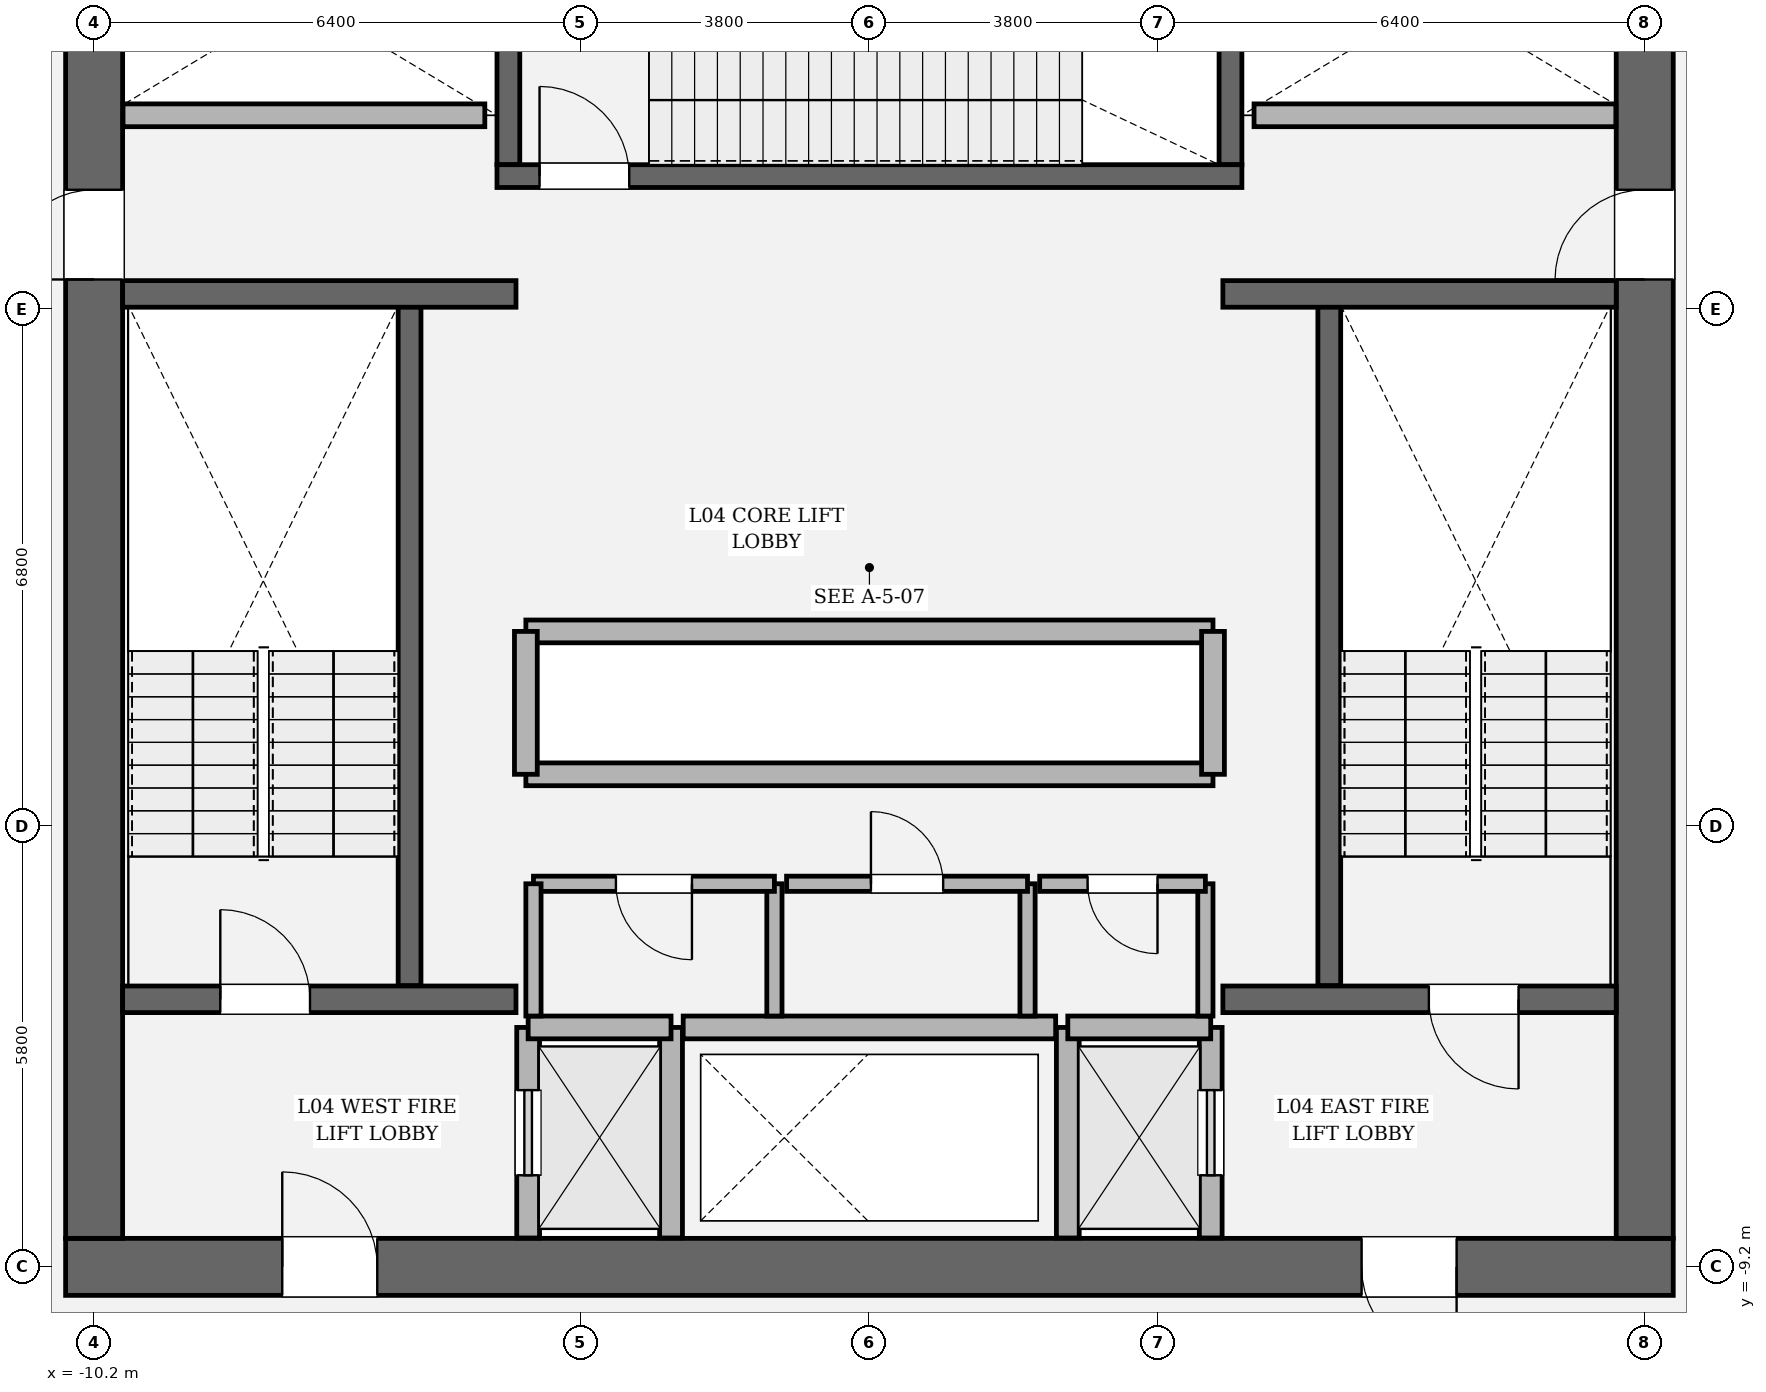
"""IFC4 building model, lengths in metres.
Left out: names, types, materials, properties, quantities, classifications, styles, units other than length and angle.
Written with IfcOpenShell. Run it as: python <this file> out.ifc"""

import sys

from ifc_helpers import new_model, si_unit, direction, frame, frame_2d, origin, place, context, subcontext, project, spatial, rectangle, extrude, element, fill, save


model = new_model("IFC4")
c1 = context("Model", 3, precision=1e-05, world=origin(), true_north=direction((0.0, 1.0)))
c2 = subcontext(c1, "Body", "Model", "MODEL_VIEW")
j1 = project(units=[si_unit("LENGTHUNIT", "METRE"), si_unit("PLANEANGLEUNIT", "RADIAN")], contexts=[c1])
p1 = place(None, origin())
s1 = spatial("IfcSite", under=j1, at=p1, CompositionType="ELEMENT")
p2 = place(p1, origin())
s2 = spatial("IfcBuilding", under=s1, at=p2, CompositionType="ELEMENT")
p3 = place(p2, frame((0.0, 0.0, 22.2)))
s3 = spatial("IfcBuildingStorey", under=s2, at=p3, CompositionType="ELEMENT", Elevation=22.2)
p4 = place(p3, frame((10.575, -9.2, 0.0), z_axis=(0.0, 0.0, 1.0), x_axis=(-1.0, 0.0, 0.0)))
e1 = element("IfcWall", 1, at=p4, inside=s3, PredefinedType="SHEAR", context=c2, shape_type="SweptSolid", body=[
    extrude(rectangle(XDim=21.15, YDim=0.75, at=frame_2d((10.575, 0.0))), origin(), (0.0, 0.0, 1.0), 6.0),
])
p5 = place(p4, frame((2.85, 0.0, 0.0)))
e2 = element("IfcOpeningElement", 2, at=p5, cuts=e1, PredefinedType="OPENING", context=c2, shape_type="SweptSolid", body=[
    extrude(rectangle(XDim=1.25, YDim=2.25, at=frame_2d((0.625, 1.125))), frame((0.0, 0.385, 0.0), z_axis=(0.0, -1.0, 0.0), x_axis=(1.0, 0.0, 0.0)), (0.0, 0.0, 1.0), 0.77),
])
p6 = place(p4, frame((17.05, 0.0, 0.0)))
e3 = element("IfcOpeningElement", 3, at=p6, cuts=e1, PredefinedType="OPENING", context=c2, shape_type="SweptSolid", body=[
    extrude(rectangle(XDim=1.25, YDim=2.25, at=frame_2d((0.625, 1.125))), frame((0.0, 0.385, 0.0), z_axis=(0.0, -1.0, 0.0), x_axis=(1.0, 0.0, 0.0)), (0.0, 0.0, 1.0), 0.77),
])
p7 = place(p3, frame((-10.2, -8.825, 0.0), z_axis=(0.0, 0.0, 1.0), x_axis=(0.0, 1.0, 0.0)))
e4 = element("IfcWall", 4, at=p7, inside=s3, PredefinedType="SHEAR", context=c2, shape_type="SweptSolid", body=[
    extrude(rectangle(XDim=17.65, YDim=0.75, at=frame_2d((8.825, 0.0))), origin(), (0.0, 0.0, 1.0), 6.0),
])
p8 = place(p7, frame((12.615, 0.0, 0.0)))
e5 = element("IfcOpeningElement", 5, at=p8, cuts=e4, PredefinedType="OPENING", context=c2, shape_type="SweptSolid", body=[
    extrude(rectangle(XDim=1.18, YDim=2.2, at=frame_2d((0.59, 1.1))), frame((0.0, 0.385, 0.0), z_axis=(0.0, -1.0, 0.0), x_axis=(1.0, 0.0, 0.0)), (0.0, 0.0, 1.0), 0.77),
])
p9 = place(p3, frame((10.2, 8.825, 0.0), z_axis=(0.0, 0.0, 1.0), x_axis=(0.0, -1.0, 0.0)))
e6 = element("IfcWall", 6, at=p9, inside=s3, PredefinedType="SHEAR", context=c2, shape_type="SweptSolid", body=[
    extrude(rectangle(XDim=17.65, YDim=0.75, at=frame_2d((8.825, 0.0))), origin(), (0.0, 0.0, 1.0), 6.0),
])
p10 = place(p9, frame((3.855, 0.0, 0.0)))
e7 = element("IfcOpeningElement", 7, at=p10, cuts=e6, PredefinedType="OPENING", context=c2, shape_type="SweptSolid", body=[
    extrude(rectangle(XDim=1.18, YDim=2.2, at=frame_2d((0.59, 1.1))), frame((0.0, 0.385, 0.0), z_axis=(0.0, -1.0, 0.0), x_axis=(1.0, 0.0, 0.0)), (0.0, 0.0, 1.0), 0.77),
])
for number, where, z_axis, x_axis in (
    (8, (-6.05, -5.5, 0.0), (0.0, 0.0, 1.0), (0.0, 1.0, 0.0)),
    (9, (6.05, 3.45, 0.0), (0.0, 0.0, 1.0), (0.0, -1.0, 0.0)),
):
    element("IfcWall", number, at=place(p3, frame(where, z_axis=z_axis, x_axis=x_axis)), inside=s3, PredefinedType="SOLIDWALL", context=c2, shape_type="SweptSolid", body=[
        extrude(rectangle(XDim=8.95, YDim=0.3, at=frame_2d((4.475, 0.0))), origin(), (0.0, 0.0, 1.0), 6.0),
    ])
for number, where, z_axis, x_axis in (
    (10, (-4.75, 5.3, 0.0), (0.0, 0.0, 1.0), (0.0, 1.0, 0.0)),
    (11, (4.75, 8.825, 0.0), (0.0, 0.0, 1.0), (0.0, -1.0, 0.0)),
):
    element("IfcWall", number, at=place(p3, frame(where, z_axis=z_axis, x_axis=x_axis)), inside=s3, PredefinedType="SOLIDWALL", context=c2, shape_type="SweptSolid", body=[
        extrude(rectangle(XDim=3.525, YDim=0.3, at=frame_2d((1.762, 0.0))), origin(), (0.0, 0.0, 1.0), 6.0),
    ])
p11 = place(p3, frame((-4.9, 5.15, 0.0), z_axis=(0.0, 0.0, 1.0), x_axis=(1.0, 0.0, 0.0)))
e12 = element("IfcWall", 12, at=p11, inside=s3, PredefinedType="SOLIDWALL", context=c2, shape_type="SweptSolid", body=[
    extrude(rectangle(XDim=9.8, YDim=0.3, at=frame_2d((4.9, 0.0))), origin(), (0.0, 0.0, 1.0), 6.0),
])
p12 = place(p11, frame((0.56, 0.0, 0.0)))
e13 = element("IfcOpeningElement", 13, at=p12, cuts=e12, PredefinedType="OPENING", context=c2, shape_type="SweptSolid", body=[
    extrude(rectangle(XDim=1.18, YDim=2.2, at=frame_2d((0.59, 1.1))), frame((0.0, 0.16, 0.0), z_axis=(0.0, -1.0, 0.0), x_axis=(1.0, 0.0, 0.0)), (0.0, 0.0, 1.0), 0.32),
])
p13 = place(p3, frame((-9.825, -5.68, 0.0), z_axis=(0.0, 0.0, 1.0), x_axis=(1.0, 0.0, 0.0)))
e14 = element("IfcWall", 14, at=p13, inside=s3, PredefinedType="SOLIDWALL", context=c2, shape_type="SweptSolid", body=[
    extrude(rectangle(XDim=5.175, YDim=0.35, at=frame_2d((2.587, 0.0))), origin(), (0.0, 0.0, 1.0), 6.0),
])
p14 = place(p13, frame((1.285, 0.0, 0.0)))
e15 = element("IfcOpeningElement", 15, at=p14, cuts=e14, PredefinedType="OPENING", context=c2, shape_type="SweptSolid", body=[
    extrude(rectangle(XDim=1.18, YDim=2.2, at=frame_2d((0.59, 1.1))), frame((0.0, 0.185, 0.0), z_axis=(0.0, -1.0, 0.0), x_axis=(1.0, 0.0, 0.0)), (0.0, 0.0, 1.0), 0.37),
])
p15 = place(p3, frame((4.65, -5.68, 0.0), z_axis=(0.0, 0.0, 1.0), x_axis=(1.0, 0.0, 0.0)))
e16 = element("IfcWall", 16, at=p15, inside=s3, PredefinedType="SOLIDWALL", context=c2, shape_type="SweptSolid", body=[
    extrude(rectangle(XDim=5.175, YDim=0.35, at=frame_2d((2.587, 0.0))), origin(), (0.0, 0.0, 1.0), 6.0),
])
p16 = place(p15, frame((2.71, 0.0, 0.0)))
e17 = element("IfcOpeningElement", 17, at=p16, cuts=e16, PredefinedType="OPENING", context=c2, shape_type="SweptSolid", body=[
    extrude(rectangle(XDim=1.18, YDim=2.2, at=frame_2d((0.59, 1.1))), frame((0.0, 0.185, 0.0), z_axis=(0.0, -1.0, 0.0), x_axis=(1.0, 0.0, 0.0)), (0.0, 0.0, 1.0), 0.37),
])
for number, where, z_axis, x_axis in (
    (18, (-9.825, 3.6, 0.0), (0.0, 0.0, 1.0), (1.0, 0.0, 0.0)),
    (19, (4.65, 3.6, 0.0), (0.0, 0.0, 1.0), (1.0, 0.0, 0.0)),
):
    element("IfcWall", number, at=place(p3, frame(where, z_axis=z_axis, x_axis=x_axis)), inside=s3, PredefinedType="SOLIDWALL", context=c2, shape_type="SweptSolid", body=[
        extrude(rectangle(XDim=5.175, YDim=0.35, at=frame_2d((2.587, 0.0))), origin(), (0.0, 0.0, 1.0), 6.0),
    ])
p17 = place(p3, frame((-4.49, -8.82, 0.0), z_axis=(0.0, 0.0, 1.0), x_axis=(0.0, 1.0, 0.0)))
e20 = element("IfcWall", 20, at=p17, inside=s3, PredefinedType="SOLIDWALL", context=c2, shape_type="SweptSolid", body=[
    extrude(rectangle(XDim=2.77, YDim=0.3, at=frame_2d((1.385, 0.0))), origin(), (0.0, 0.0, 1.0), 5.72),
])
p18 = place(p17, frame((0.825, 0.0, 0.0)))
e21 = element("IfcOpeningElement", 21, at=p18, cuts=e20, PredefinedType="OPENING", context=c2, shape_type="SweptSolid", body=[
    extrude(rectangle(XDim=1.12, YDim=2.25, at=frame_2d((0.56, 1.125))), frame((0.0, 0.16, 0.0), z_axis=(0.0, -1.0, 0.0), x_axis=(1.0, 0.0, 0.0)), (0.0, 0.0, 1.0), 0.32),
])
p19 = place(p3, frame((-2.61, -8.82, 0.0), z_axis=(0.0, 0.0, 1.0), x_axis=(0.0, 1.0, 0.0)))
e22 = element("IfcWall", 22, at=p19, inside=s3, PredefinedType="SOLIDWALL", context=c2, shape_type="SweptSolid", body=[
    extrude(rectangle(XDim=2.77, YDim=0.3, at=frame_2d((1.385, 0.0))), origin(), (0.0, 0.0, 1.0), 5.72),
])
p20 = place(p3, frame((-4.49, -6.05, 0.0), z_axis=(0.0, 0.0, 1.0), x_axis=(1.0, 0.0, 0.0)))
e23 = element("IfcWall", 23, at=p20, inside=s3, PredefinedType="SOLIDWALL", context=c2, shape_type="SweptSolid", body=[
    extrude(rectangle(XDim=1.88, YDim=0.3, at=frame_2d((0.94, 0.0))), origin(), (0.0, 0.0, 1.0), 5.72),
])
p21 = place(p3, frame((4.49, -8.82, 0.0), z_axis=(0.0, 0.0, 1.0), x_axis=(0.0, 1.0, 0.0)))
e24 = element("IfcWall", 24, at=p21, inside=s3, PredefinedType="SOLIDWALL", context=c2, shape_type="SweptSolid", body=[
    extrude(rectangle(XDim=2.77, YDim=0.3, at=frame_2d((1.385, 0.0))), origin(), (0.0, 0.0, 1.0), 5.72),
])
p22 = place(p21, frame((0.825, 0.0, 0.0)))
e25 = element("IfcOpeningElement", 25, at=p22, cuts=e24, PredefinedType="OPENING", context=c2, shape_type="SweptSolid", body=[
    extrude(rectangle(XDim=1.12, YDim=2.25, at=frame_2d((0.56, 1.125))), frame((0.0, 0.16, 0.0), z_axis=(0.0, -1.0, 0.0), x_axis=(1.0, 0.0, 0.0)), (0.0, 0.0, 1.0), 0.32),
])
p23 = place(p3, frame((2.61, -8.82, 0.0), z_axis=(0.0, 0.0, 1.0), x_axis=(0.0, 1.0, 0.0)))
e26 = element("IfcWall", 26, at=p23, inside=s3, PredefinedType="SOLIDWALL", context=c2, shape_type="SweptSolid", body=[
    extrude(rectangle(XDim=2.77, YDim=0.3, at=frame_2d((1.385, 0.0))), origin(), (0.0, 0.0, 1.0), 5.72),
])
p24 = place(p3, frame((2.61, -6.05, 0.0), z_axis=(0.0, 0.0, 1.0), x_axis=(1.0, 0.0, 0.0)))
e27 = element("IfcWall", 27, at=p24, inside=s3, PredefinedType="SOLIDWALL", context=c2, shape_type="SweptSolid", body=[
    extrude(rectangle(XDim=1.88, YDim=0.3, at=frame_2d((0.94, 0.0))), origin(), (0.0, 0.0, 1.0), 5.72),
])
for number, where, z_axis, x_axis in (
    (28, (-4.52, -0.84, 0.0), (0.0, 0.0, 1.0), (1.0, 0.0, 0.0)),
    (29, (-4.52, -2.72, 0.0), (0.0, 0.0, 1.0), (1.0, 0.0, 0.0)),
):
    element("IfcWall", number, at=place(p3, frame(where, z_axis=z_axis, x_axis=x_axis)), inside=s3, PredefinedType="SOLIDWALL", context=c2, shape_type="SweptSolid", body=[
        extrude(rectangle(XDim=9.04, YDim=0.3, at=frame_2d((4.52, 0.0))), origin(), (0.0, 0.0, 1.0), 5.72),
    ])
for number, where, z_axis, x_axis in (
    (30, (-4.52, -2.72, 0.0), (0.0, 0.0, 1.0), (0.0, 1.0, 0.0)),
    (31, (4.52, -2.72, 0.0), (0.0, 0.0, 1.0), (0.0, 1.0, 0.0)),
):
    element("IfcWall", number, at=place(p3, frame(where, z_axis=z_axis, x_axis=x_axis)), inside=s3, PredefinedType="SOLIDWALL", context=c2, shape_type="SweptSolid", body=[
        extrude(rectangle(XDim=1.88, YDim=0.3, at=frame_2d((0.94, 0.0))), origin(), (0.0, 0.0, 1.0), 5.72),
    ])
for number, where, z_axis, x_axis in (
    (32, (-9.82, 5.95, 0.0), (0.0, 0.0, 1.0), (1.0, 0.0, 0.0)),
    (33, (5.06, 5.95, 0.0), (0.0, 0.0, 1.0), (1.0, 0.0, 0.0)),
):
    element("IfcWall", number, at=place(p3, frame(where, z_axis=z_axis, x_axis=x_axis)), inside=s3, PredefinedType="SOLIDWALL", context=c2, shape_type="SweptSolid", body=[
        extrude(rectangle(XDim=4.76, YDim=0.3, at=frame_2d((2.38, 0.0))), origin(), (0.0, 0.0, 1.0), 5.72),
    ])
p25 = place(p3, frame((-2.45, -6.05, 0.0), z_axis=(0.0, 0.0, 1.0), x_axis=(1.0, 0.0, 0.0)))
e34 = element("IfcWall", 34, at=p25, inside=s3, PredefinedType="SOLIDWALL", context=c2, shape_type="SweptSolid", body=[
    extrude(rectangle(XDim=4.9, YDim=0.3, at=frame_2d((2.45, 0.0))), origin(), (0.0, 0.0, 1.0), 5.72),
])
p26 = place(p3, frame((-1.25, -5.9, 0.0), z_axis=(0.0, 0.0, 1.0), x_axis=(0.0, 1.0, 0.0)))
e35 = element("IfcWall", 35, at=p26, inside=s3, PredefinedType="SOLIDWALL", context=c2, shape_type="SweptSolid", body=[
    extrude(rectangle(XDim=1.74, YDim=0.2, at=frame_2d((0.87, 0.0))), origin(), (0.0, 0.0, 1.0), 5.72),
])
p27 = place(p3, frame((-1.25, -4.16, 0.0), z_axis=(0.0, 0.0, 1.0), x_axis=(-1.0, 0.0, 0.0)))
e36 = element("IfcWall", 36, at=p27, inside=s3, PredefinedType="SOLIDWALL", context=c2, shape_type="SweptSolid", body=[
    extrude(rectangle(XDim=3.17, YDim=0.2, at=frame_2d((1.585, 0.0))), origin(), (0.0, 0.0, 1.0), 5.72),
])
p28 = place(p27, frame((1.085, 0.0, 0.0)))
e37 = element("IfcOpeningElement", 37, at=p28, cuts=e36, PredefinedType="OPENING", context=c2, shape_type="SweptSolid", body=[
    extrude(rectangle(XDim=1.0, YDim=2.15, at=frame_2d((0.5, 1.075))), frame((0.0, 0.11, 0.0), z_axis=(0.0, -1.0, 0.0), x_axis=(1.0, 0.0, 0.0)), (0.0, 0.0, 1.0), 0.22),
])
for number, where, z_axis, x_axis in (
    (38, (-4.42, -4.16, 0.0), (0.0, 0.0, 1.0), (0.0, -1.0, 0.0)),
    (39, (2.08, -5.9, 0.0), (0.0, 0.0, 1.0), (0.0, 1.0, 0.0)),
):
    element("IfcWall", number, at=place(p3, frame(where, z_axis=z_axis, x_axis=x_axis)), inside=s3, PredefinedType="SOLIDWALL", context=c2, shape_type="SweptSolid", body=[
        extrude(rectangle(XDim=1.74, YDim=0.2, at=frame_2d((0.87, 0.0))), origin(), (0.0, 0.0, 1.0), 5.72),
    ])
p29 = place(p3, frame((2.08, -4.16, 0.0), z_axis=(0.0, 0.0, 1.0), x_axis=(-1.0, 0.0, 0.0)))
e40 = element("IfcWall", 40, at=p29, inside=s3, PredefinedType="SOLIDWALL", context=c2, shape_type="SweptSolid", body=[
    extrude(rectangle(XDim=3.17, YDim=0.2, at=frame_2d((1.585, 0.0))), origin(), (0.0, 0.0, 1.0), 5.72),
])
p30 = place(p29, frame((1.11, 0.0, 0.0)))
e41 = element("IfcOpeningElement", 41, at=p30, cuts=e40, PredefinedType="OPENING", context=c2, shape_type="SweptSolid", body=[
    extrude(rectangle(XDim=0.95, YDim=2.15, at=frame_2d((0.475, 1.075))), frame((0.0, 0.11, 0.0), z_axis=(0.0, -1.0, 0.0), x_axis=(1.0, 0.0, 0.0)), (0.0, 0.0, 1.0), 0.22),
])
p31 = place(p3, frame((4.42, -5.9, 0.0), z_axis=(0.0, 0.0, 1.0), x_axis=(0.0, 1.0, 0.0)))
e42 = element("IfcWall", 42, at=p31, inside=s3, PredefinedType="SOLIDWALL", context=c2, shape_type="SweptSolid", body=[
    extrude(rectangle(XDim=1.74, YDim=0.2, at=frame_2d((0.87, 0.0))), origin(), (0.0, 0.0, 1.0), 5.72),
])
p32 = place(p3, frame((4.42, -4.16, 0.0), z_axis=(0.0, 0.0, 1.0), x_axis=(-1.0, 0.0, 0.0)))
e43 = element("IfcWall", 43, at=p32, inside=s3, PredefinedType="SOLIDWALL", context=c2, shape_type="SweptSolid", body=[
    extrude(rectangle(XDim=2.18, YDim=0.2, at=frame_2d((1.09, 0.0))), origin(), (0.0, 0.0, 1.0), 5.72),
])
p33 = place(p32, frame((0.63, 0.0, 0.0)))
e44 = element("IfcOpeningElement", 44, at=p33, cuts=e43, PredefinedType="OPENING", context=c2, shape_type="SweptSolid", body=[
    extrude(rectangle(XDim=0.92, YDim=2.1, at=frame_2d((0.46, 1.05))), frame((0.0, 0.11, 0.0), z_axis=(0.0, -1.0, 0.0), x_axis=(1.0, 0.0, 0.0)), (0.0, 0.0, 1.0), 0.22),
])
p34 = place(p14, origin())
e45 = element("IfcDoor", 45, at=p34, inside=s3, OperationType="SINGLE_SWING_LEFT", PredefinedType="DOOR", context=c2, shape_type="SweptSolid", body=[
    extrude(rectangle(XDim=1.18, YDim=2.2, at=frame_2d((0.59, 1.1))), frame((0.0, 0.025, 0.0), z_axis=(0.0, -1.0, 0.0), x_axis=(1.0, 0.0, 0.0)), (0.0, 0.0, 1.0), 0.05),
])
fill(e15, e45)
p35 = place(p16, origin())
e46 = element("IfcDoor", 46, at=p35, inside=s3, OperationType="SINGLE_SWING_RIGHT", PredefinedType="DOOR", context=c2, shape_type="SweptSolid", body=[
    extrude(rectangle(XDim=1.18, YDim=2.2, at=frame_2d((0.59, 1.1))), frame((0.0, 0.025, 0.0), z_axis=(0.0, -1.0, 0.0), x_axis=(1.0, 0.0, 0.0)), (0.0, 0.0, 1.0), 0.05),
])
fill(e17, e46)
p36 = place(p12, origin())
e47 = element("IfcDoor", 47, at=p36, inside=s3, OperationType="SINGLE_SWING_LEFT", PredefinedType="DOOR", context=c2, shape_type="SweptSolid", body=[
    extrude(rectangle(XDim=1.18, YDim=2.2, at=frame_2d((0.59, 1.1))), frame((0.0, 0.025, 0.0), z_axis=(0.0, -1.0, 0.0), x_axis=(1.0, 0.0, 0.0)), (0.0, 0.0, 1.0), 0.05),
])
fill(e13, e47)
p37 = place(p5, origin())
e48 = element("IfcDoor", 48, at=p37, inside=s3, OperationType="SINGLE_SWING_LEFT", PredefinedType="DOOR", context=c2, shape_type="SweptSolid", body=[
    extrude(rectangle(XDim=1.25, YDim=2.25, at=frame_2d((0.625, 1.125))), frame((0.0, 0.025, 0.0), z_axis=(0.0, -1.0, 0.0), x_axis=(1.0, 0.0, 0.0)), (0.0, 0.0, 1.0), 0.05),
])
fill(e2, e48)
p38 = place(p6, origin())
e49 = element("IfcDoor", 49, at=p38, inside=s3, OperationType="SINGLE_SWING_RIGHT", PredefinedType="DOOR", context=c2, shape_type="SweptSolid", body=[
    extrude(rectangle(XDim=1.25, YDim=2.25, at=frame_2d((0.625, 1.125))), frame((0.0, 0.025, 0.0), z_axis=(0.0, -1.0, 0.0), x_axis=(1.0, 0.0, 0.0)), (0.0, 0.0, 1.0), 0.05),
])
fill(e3, e49)
p39 = place(p8, origin())
e50 = element("IfcDoor", 50, at=p39, inside=s3, OperationType="SINGLE_SWING_LEFT", PredefinedType="DOOR", context=c2, shape_type="SweptSolid", body=[
    extrude(rectangle(XDim=1.18, YDim=2.2, at=frame_2d((0.59, 1.1))), frame((0.0, 0.025, 0.0), z_axis=(0.0, -1.0, 0.0), x_axis=(1.0, 0.0, 0.0)), (0.0, 0.0, 1.0), 0.05),
])
fill(e5, e50)
p40 = place(p10, origin())
e51 = element("IfcDoor", 51, at=p40, inside=s3, OperationType="SINGLE_SWING_RIGHT", PredefinedType="DOOR", context=c2, shape_type="SweptSolid", body=[
    extrude(rectangle(XDim=1.18, YDim=2.2, at=frame_2d((0.59, 1.1))), frame((0.0, 0.025, 0.0), z_axis=(0.0, -1.0, 0.0), x_axis=(1.0, 0.0, 0.0)), (0.0, 0.0, 1.0), 0.05),
])
fill(e7, e51)
p41 = place(p18, origin())
e52 = element("IfcDoor", 52, at=p41, inside=s3, OperationType="SLIDING_TO_LEFT", PredefinedType="DOOR", context=c2, shape_type="SweptSolid", body=[
    extrude(rectangle(XDim=1.12, YDim=2.25, at=frame_2d((0.56, 1.125))), frame((0.0, 0.025, 0.0), z_axis=(0.0, -1.0, 0.0), x_axis=(1.0, 0.0, 0.0)), (0.0, 0.0, 1.0), 0.05),
])
fill(e21, e52)
p42 = place(p22, origin())
e53 = element("IfcDoor", 53, at=p42, inside=s3, OperationType="SLIDING_TO_RIGHT", PredefinedType="DOOR", context=c2, shape_type="SweptSolid", body=[
    extrude(rectangle(XDim=1.12, YDim=2.25, at=frame_2d((0.56, 1.125))), frame((0.0, 0.025, 0.0), z_axis=(0.0, -1.0, 0.0), x_axis=(1.0, 0.0, 0.0)), (0.0, 0.0, 1.0), 0.05),
])
fill(e25, e53)
p43 = place(p28, origin())
e54 = element("IfcDoor", 54, at=p43, inside=s3, OperationType="SINGLE_SWING_LEFT", PredefinedType="DOOR", context=c2, shape_type="SweptSolid", body=[
    extrude(rectangle(XDim=1.0, YDim=2.15, at=frame_2d((0.5, 1.075))), frame((0.0, 0.025, 0.0), z_axis=(0.0, -1.0, 0.0), x_axis=(1.0, 0.0, 0.0)), (0.0, 0.0, 1.0), 0.05),
])
fill(e37, e54)
p44 = place(p30, origin())
e55 = element("IfcDoor", 55, at=p44, inside=s3, OperationType="SINGLE_SWING_RIGHT", PredefinedType="DOOR", context=c2, shape_type="SweptSolid", body=[
    extrude(rectangle(XDim=0.95, YDim=2.15, at=frame_2d((0.475, 1.075))), frame((0.0, 0.025, 0.0), z_axis=(0.0, -1.0, 0.0), x_axis=(1.0, 0.0, 0.0)), (0.0, 0.0, 1.0), 0.05),
])
fill(e41, e55)
p45 = place(p33, origin())
e56 = element("IfcDoor", 56, at=p45, inside=s3, OperationType="SINGLE_SWING_LEFT", PredefinedType="DOOR", context=c2, shape_type="SweptSolid", body=[
    extrude(rectangle(XDim=0.92, YDim=2.1, at=frame_2d((0.46, 1.05))), frame((0.0, 0.025, 0.0), z_axis=(0.0, -1.0, 0.0), x_axis=(1.0, 0.0, 0.0)), (0.0, 0.0, 1.0), 0.05),
])
fill(e44, e56)
save(model, sys.argv[1])
